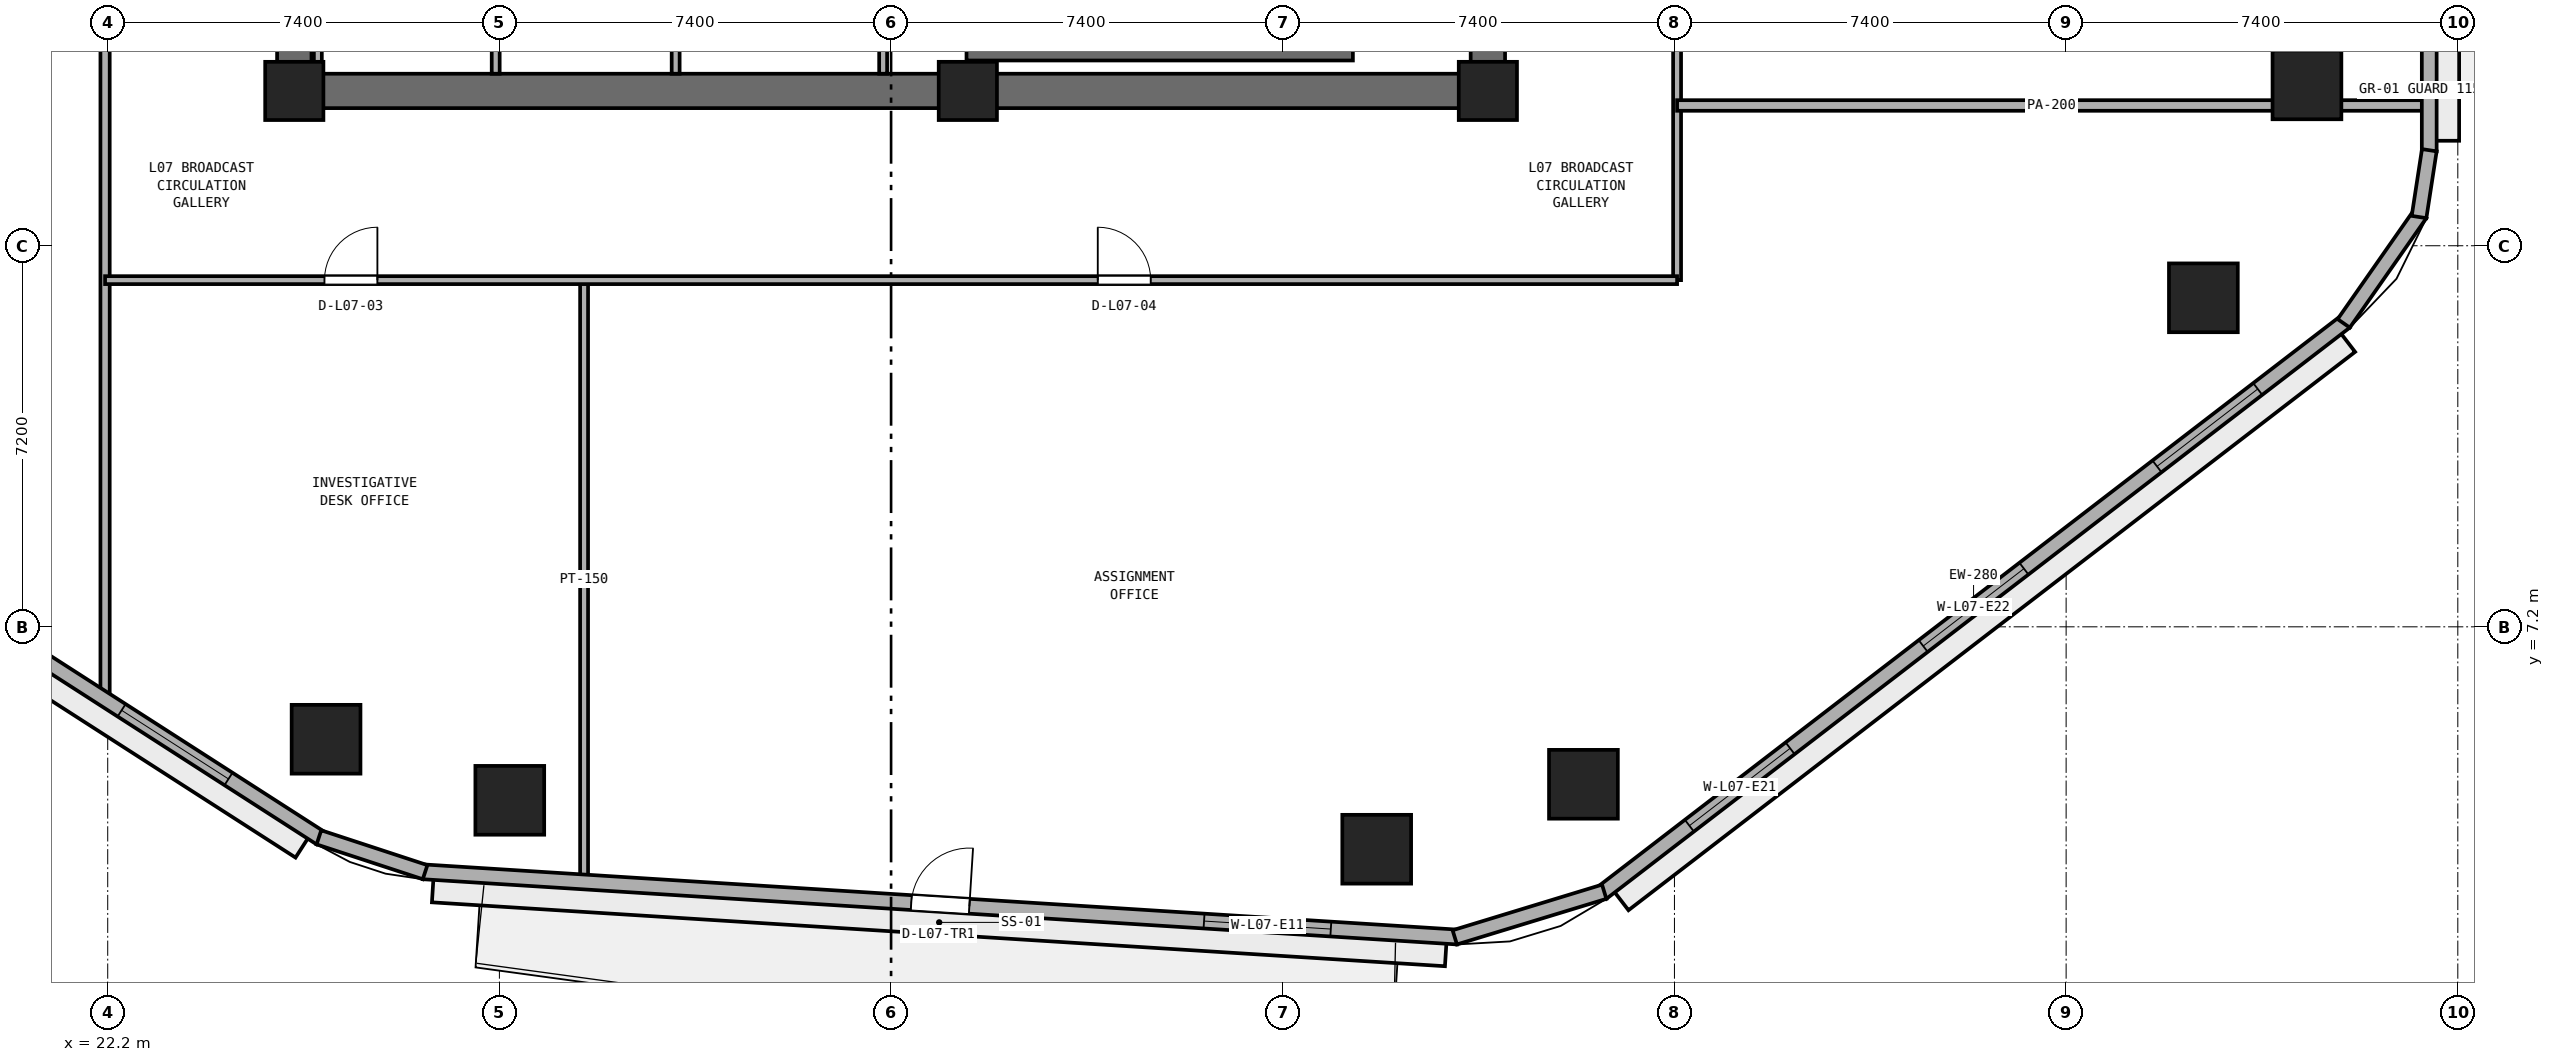
"""IFC4 building model, lengths in metres.
Left out: names, types, materials, properties, quantities, classifications, styles, units other than length and angle.
Written with IfcOpenShell. Run it as: python <this file> out.ifc"""

import sys

from ifc_helpers import new_model, si_unit, direction, frame, frame_2d, origin, origin_2d, place, context, subcontext, project, spatial, rectangle, extrude, element, fill, save


model = new_model("IFC4")
c1 = context("Model", 3, precision=1e-05, world=origin(), true_north=direction((0.0, 1.0)))
c2 = subcontext(c1, "Body", "Model", "MODEL_VIEW")
j1 = project(units=[si_unit("LENGTHUNIT", "METRE"), si_unit("PLANEANGLEUNIT", "RADIAN")], contexts=[c1])
p1 = place(None, origin())
s1 = spatial("IfcSite", under=j1, at=p1, CompositionType="ELEMENT")
p2 = place(p1, origin())
s2 = spatial("IfcBuilding", under=s1, at=p2, CompositionType="ELEMENT")
p3 = place(p2, frame((0.0, 0.0, 32.6)))
s3 = spatial("IfcBuildingStorey", under=s2, at=p3, CompositionType="ELEMENT", Elevation=32.6)
p4 = place(p3, frame((25.4, 17.325, 0.0), z_axis=(0.0, 0.0, 1.0), x_axis=(1.0, 0.0, 0.0)))
e1 = element("IfcWall", 1, at=p4, inside=s3, PredefinedType="SHEAR", context=c2, shape_type="SweptSolid", body=[
    extrude(rectangle(XDim=23.2, YDim=0.65, at=frame_2d((11.6, 0.0))), origin(), (0.0, 0.0, 1.0), 3.525),
])
p5 = place(p3, frame((25.725, 17.65, 0.0), z_axis=(0.0, 0.0, 1.0), x_axis=(0.0, 1.0, 0.0)))
e2 = element("IfcWall", 2, at=p5, inside=s3, PredefinedType="SHEAR", context=c2, shape_type="SweptSolid", body=[
    extrude(rectangle(XDim=15.1, YDim=0.65, at=frame_2d((7.55, 0.0))), origin(), (0.0, 0.0, 1.0), 3.525),
])
p6 = place(p5, frame((6.8, 0.0, 0.0)))
e3 = element("IfcOpeningElement", 3, at=p6, cuts=e2, PredefinedType="OPENING", context=c2, shape_type="SweptSolid", body=[
    extrude(rectangle(XDim=1.5, YDim=2.15, at=frame_2d((0.75, 1.075))), frame((0.0, 0.335, 0.0), z_axis=(0.0, -1.0, 0.0), x_axis=(1.0, 0.0, 0.0)), (0.0, 0.0, 1.0), 0.67),
])
p7 = place(p3, frame((48.275, 17.65, 0.0), z_axis=(0.0, 0.0, 1.0), x_axis=(0.0, 1.0, 0.0)))
e4 = element("IfcWall", 4, at=p7, inside=s3, PredefinedType="SHEAR", context=c2, shape_type="SweptSolid", body=[
    extrude(rectangle(XDim=15.1, YDim=0.65, at=frame_2d((7.55, 0.0))), origin(), (0.0, 0.0, 1.0), 3.525),
])
p8 = place(p7, frame((5.65, 0.0, 0.0)))
e5 = element("IfcOpeningElement", 5, at=p8, cuts=e4, PredefinedType="OPENING", context=c2, shape_type="SweptSolid", body=[
    extrude(rectangle(XDim=1.5, YDim=2.15, at=frame_2d((0.75, 1.075))), frame((0.0, 0.335, 0.0), z_axis=(0.0, -1.0, 0.0), x_axis=(1.0, 0.0, 0.0)), (0.0, 0.0, 1.0), 0.67),
])
for number, where, z_axis, x_axis in (
    (6, (25.725, 17.325, 0.0), (0.0, 0.0, 1.0), (1.0, 0.0, 0.0)),
    (7, (38.45, 17.325, 0.0), (0.0, 0.0, 1.0), (1.0, 0.0, 0.0)),
    (8, (48.275, 17.325, 0.0), (0.0, 0.0, 1.0), (1.0, 0.0, 0.0)),
):
    element("IfcColumn", number, at=place(p3, frame(where, z_axis=z_axis, x_axis=x_axis)), inside=s3, PredefinedType="PILASTER", context=c2, shape_type="SweptSolid", body=[
        extrude(rectangle(XDim=1.1, YDim=1.1, at=origin_2d()), origin(), (0.0, 0.0, 1.0), 3.8),
    ])
for number, where, z_axis, x_axis in (
    (9, (29.796, 3.922, 0.0), (0.0, 0.0, 1.0), (1.0, 0.0, 0.0)),
    (10, (46.175, 2.998, 0.0), (0.0, 0.0, 1.0), (1.0, 0.0, 0.0)),
    (11, (50.081, 4.225, 0.0), (0.0, 0.0, 1.0), (1.0, 0.0, 0.0)),
    (12, (61.793, 13.416, 0.0), (0.0, 0.0, 1.0), (1.0, 0.0, 0.0)),
    (13, (63.75, 17.44, 0.0), (0.0, 0.0, 1.0), (1.0, 0.0, 0.0)),
    (14, (26.325, 5.076, 0.0), (0.0, 0.0, 1.0), (1.0, 0.0, 0.0)),
):
    element("IfcColumn", number, at=place(p3, frame(where, z_axis=z_axis, x_axis=x_axis)), inside=s3, PredefinedType="COLUMN", context=c2, shape_type="SweptSolid", body=[
        extrude(rectangle(XDim=1.3, YDim=1.3, at=origin_2d()), origin(), (0.0, 0.0, 1.0), 3.8),
    ])
p9 = place(p3, frame((38.425, 18.025, 0.0), z_axis=(0.0, 0.0, 1.0), x_axis=(1.0, 0.0, 0.0)))
e15 = element("IfcWall", 15, at=p9, inside=s3, PredefinedType="SHEAR", context=c2, shape_type="SweptSolid", body=[
    extrude(rectangle(XDim=7.3, YDim=0.25, at=frame_2d((3.65, 0.0))), origin(), (0.0, 0.0, 1.0), 3.525),
])
for number, where, z_axis, x_axis in (
    (16, (26.17, 17.65, 0.0), (0.0, 0.0, 1.0), (0.0, 1.0, 0.0)),
    (17, (29.53, 17.65, 0.0), (0.0, 0.0, 1.0), (0.0, 1.0, 0.0)),
    (18, (32.93, 17.65, 0.0), (0.0, 0.0, 1.0), (0.0, 1.0, 0.0)),
    (19, (36.85, 17.65, 0.0), (0.0, 0.0, 1.0), (0.0, 1.0, 0.0)),
):
    element("IfcWall", number, at=place(p3, frame(where, z_axis=z_axis, x_axis=x_axis)), inside=s3, PredefinedType="PARTITIONING", context=c2, shape_type="SweptSolid", body=[
        extrude(rectangle(XDim=2.1, YDim=0.15, at=frame_2d((1.05, 0.0))), origin(), (0.0, 0.0, 1.0), 3.525),
    ])
p10 = place(p3, frame((51.85, 13.75, 0.0), z_axis=(0.0, 0.0, 1.0), x_axis=(0.0, 1.0, 0.0)))
e20 = element("IfcWall", 20, at=p10, inside=s3, PredefinedType="PARTITIONING", context=c2, shape_type="SweptSolid", body=[
    extrude(rectangle(XDim=33.644, YDim=0.15, at=frame_2d((16.822, 0.0))), origin(), (0.0, 0.0, 1.0), 3.525),
])
p11 = place(p10, frame((5.425, 0.0, 0.0)))
e21 = element("IfcOpeningElement", 21, at=p11, cuts=e20, PredefinedType="OPENING", context=c2, shape_type="SweptSolid", body=[
    extrude(rectangle(XDim=0.9, YDim=2.1, at=frame_2d((0.45, 1.05))), frame((0.0, 0.085, 0.0), z_axis=(0.0, -1.0, 0.0), x_axis=(1.0, 0.0, 0.0)), (0.0, 0.0, 1.0), 0.17),
])
p12 = place(p10, frame((15.225, 0.0, 0.0)))
e22 = element("IfcOpeningElement", 22, at=p12, cuts=e20, PredefinedType="OPENING", context=c2, shape_type="SweptSolid", body=[
    extrude(rectangle(XDim=0.9, YDim=2.1, at=frame_2d((0.45, 1.05))), frame((0.0, 0.085, 0.0), z_axis=(0.0, -1.0, 0.0), x_axis=(1.0, 0.0, 0.0)), (0.0, 0.0, 1.0), 0.17),
])
p13 = place(p3, frame((31.2, 2.444, 0.0), z_axis=(0.0, 0.0, 1.0), x_axis=(0.0, 1.0, 0.0)))
e23 = element("IfcWall", 23, at=p13, inside=s3, PredefinedType="PARTITIONING", context=c2, shape_type="SweptSolid", body=[
    extrude(rectangle(XDim=11.306, YDim=0.15, at=frame_2d((5.653, 0.0))), origin(), (0.0, 0.0, 1.0), 3.525),
])
p14 = place(p3, frame((22.15, 5.798, 0.0), z_axis=(0.0, 0.0, 1.0), x_axis=(0.0, 1.0, 0.0)))
e24 = element("IfcWall", 24, at=p14, inside=s3, PredefinedType="PARTITIONING", context=c2, shape_type="SweptSolid", body=[
    extrude(rectangle(XDim=30.852, YDim=0.175, at=frame_2d((15.426, 0.0))), origin(), (0.0, 0.0, 1.0), 3.525),
])
p15 = place(p14, frame((17.302, 0.0, 0.0)))
e25 = element("IfcOpeningElement", 25, at=p15, cuts=e24, PredefinedType="OPENING", context=c2, shape_type="SweptSolid", body=[
    extrude(rectangle(XDim=0.9, YDim=2.1, at=frame_2d((0.45, 1.05))), frame((0.0, 0.097, 0.0), z_axis=(0.0, -1.0, 0.0), x_axis=(1.0, 0.0, 0.0)), (0.0, 0.0, 1.0), 0.195),
])
p16 = place(p3, frame((22.15, 13.75, 0.0), z_axis=(0.0, 0.0, 1.0), x_axis=(1.0, 0.0, 0.0)))
e26 = element("IfcWall", 26, at=p16, inside=s3, PredefinedType="PARTITIONING", context=c2, shape_type="SweptSolid", body=[
    extrude(rectangle(XDim=29.7, YDim=0.15, at=frame_2d((14.85, 0.0))), origin(), (0.0, 0.0, 1.0), 3.525),
])
p17 = place(p16, frame((4.145, 0.0, 0.0)))
e27 = element("IfcOpeningElement", 27, at=p17, cuts=e26, PredefinedType="OPENING", context=c2, shape_type="SweptSolid", body=[
    extrude(rectangle(XDim=1.0, YDim=2.12, at=frame_2d((0.5, 1.06))), frame((0.0, 0.085, 0.0), z_axis=(0.0, -1.0, 0.0), x_axis=(1.0, 0.0, 0.0)), (0.0, 0.0, 1.0), 0.17),
])
p18 = place(p16, frame((18.755, 0.0, 0.0)))
e28 = element("IfcOpeningElement", 28, at=p18, cuts=e26, PredefinedType="OPENING", context=c2, shape_type="SweptSolid", body=[
    extrude(rectangle(XDim=1.0, YDim=2.12, at=frame_2d((0.5, 1.06))), frame((0.0, 0.085, 0.0), z_axis=(0.0, -1.0, 0.0), x_axis=(1.0, 0.0, 0.0)), (0.0, 0.0, 1.0), 0.17),
])
p19 = place(p3, frame((51.85, 17.05, 0.0), z_axis=(0.0, 0.0, 1.0), x_axis=(1.0, 0.0, 0.0)))
e29 = element("IfcWall", 29, at=p19, inside=s3, PredefinedType="PARTITIONING", context=c2, shape_type="SweptSolid", body=[
    extrude(rectangle(XDim=14.145, YDim=0.2, at=frame_2d((7.073, 0.0))), origin(), (0.0, 0.0, 1.0), 3.525),
])
p20 = place(p3, frame((28.161, 2.571, 0.0), z_axis=(0.0, 0.0, 1.0), x_axis=(0.998017288298, -0.06294038654, 0.0)))
e30 = element("IfcWall", 30, at=p20, inside=s3, PredefinedType="STANDARD", context=c2, shape_type="SweptSolid", body=[
    extrude(rectangle(XDim=19.577, YDim=0.28, at=frame_2d((9.789, 0.0))), origin(), (0.0, 0.0, 1.0), 3.525),
])
p21 = place(p20, frame((9.239, 0.0, 0.0)))
e31 = element("IfcOpeningElement", 31, at=p21, cuts=e30, PredefinedType="OPENING", context=c2, shape_type="SweptSolid", body=[
    extrude(rectangle(XDim=1.1, YDim=2.2, at=frame_2d((0.55, 1.1))), frame((0.0, 0.15, 0.0), z_axis=(0.0, -1.0, 0.0), x_axis=(1.0, 0.0, 0.0)), (0.0, 0.0, 1.0), 0.3),
])
p22 = place(p20, frame((14.781, 0.0, 0.9)))
e32 = element("IfcOpeningElement", 32, at=p22, cuts=e30, PredefinedType="OPENING", context=c2, shape_type="SweptSolid", body=[
    extrude(rectangle(XDim=2.4, YDim=1.75, at=frame_2d((1.2, 0.875))), frame((0.0, 0.15, 0.0), z_axis=(0.0, -1.0, 0.0), x_axis=(1.0, 0.0, 0.0)), (0.0, 0.0, 1.0), 0.3),
])
p23 = place(p3, frame((50.429, 2.172, 0.0), z_axis=(0.0, 0.0, 1.0), x_axis=(0.792937466367, 0.609303023488, 0.0)))
e33 = element("IfcWall", 33, at=p23, inside=s3, PredefinedType="STANDARD", context=c2, shape_type="SweptSolid", body=[
    extrude(rectangle(XDim=17.713, YDim=0.28, at=frame_2d((8.856, 0.0))), origin(), (0.0, 0.0, 1.0), 3.525),
])
p24 = place(p23, frame((2.085, 0.0, 0.9)))
e34 = element("IfcOpeningElement", 34, at=p24, cuts=e33, PredefinedType="OPENING", context=c2, shape_type="SweptSolid", body=[
    extrude(rectangle(XDim=2.4, YDim=1.75, at=frame_2d((1.2, 0.875))), frame((0.0, 0.15, 0.0), z_axis=(0.0, -1.0, 0.0), x_axis=(1.0, 0.0, 0.0)), (0.0, 0.0, 1.0), 0.3),
])
p25 = place(p23, frame((7.656, 0.0, 0.9)))
e35 = element("IfcOpeningElement", 35, at=p25, cuts=e33, PredefinedType="OPENING", context=c2, shape_type="SweptSolid", body=[
    extrude(rectangle(XDim=2.4, YDim=1.75, at=frame_2d((1.2, 0.875))), frame((0.0, 0.15, 0.0), z_axis=(0.0, -1.0, 0.0), x_axis=(1.0, 0.0, 0.0)), (0.0, 0.0, 1.0), 0.3),
])
p26 = place(p23, frame((13.227, 0.0, 0.9)))
e36 = element("IfcOpeningElement", 36, at=p26, cuts=e33, PredefinedType="OPENING", context=c2, shape_type="SweptSolid", body=[
    extrude(rectangle(XDim=2.4, YDim=1.75, at=frame_2d((1.2, 0.875))), frame((0.0, 0.15, 0.0), z_axis=(0.0, -1.0, 0.0), x_axis=(1.0, 0.0, 0.0)), (0.0, 0.0, 1.0), 0.3),
])
p27 = place(p3, frame((66.06, 16.183, 0.0), z_axis=(0.0, 0.0, 1.0), x_axis=(0.0, 1.0, 0.0)))
e37 = element("IfcWall", 37, at=p27, inside=s3, PredefinedType="STANDARD", context=c2, shape_type="SweptSolid", body=[
    extrude(rectangle(XDim=19.331, YDim=0.28, at=frame_2d((9.666, 0.0))), origin(), (0.0, 0.0, 1.0), 3.525),
])
p28 = place(p27, frame((9.115, 0.0, 0.0)))
e38 = element("IfcOpeningElement", 38, at=p28, cuts=e37, PredefinedType="OPENING", context=c2, shape_type="SweptSolid", body=[
    extrude(rectangle(XDim=1.1, YDim=2.2, at=frame_2d((0.55, 1.1))), frame((0.0, 0.15, 0.0), z_axis=(0.0, -1.0, 0.0), x_axis=(1.0, 0.0, 0.0)), (0.0, 0.0, 1.0), 0.3),
])
p29 = place(p27, frame((2.355, 0.0, 0.9)))
e39 = element("IfcOpeningElement", 39, at=p29, cuts=e37, PredefinedType="OPENING", context=c2, shape_type="SweptSolid", body=[
    extrude(rectangle(XDim=2.4, YDim=1.75, at=frame_2d((1.2, 0.875))), frame((0.0, 0.15, 0.0), z_axis=(0.0, -1.0, 0.0), x_axis=(1.0, 0.0, 0.0)), (0.0, 0.0, 1.0), 0.3),
])
p30 = place(p27, frame((14.576, 0.0, 0.9)))
e40 = element("IfcOpeningElement", 40, at=p30, cuts=e37, PredefinedType="OPENING", context=c2, shape_type="SweptSolid", body=[
    extrude(rectangle(XDim=2.4, YDim=1.75, at=frame_2d((1.2, 0.875))), frame((0.0, 0.15, 0.0), z_axis=(0.0, -1.0, 0.0), x_axis=(1.0, 0.0, 0.0)), (0.0, 0.0, 1.0), 0.3),
])
p31 = place(p3, frame((11.405, 12.728, 0.0), z_axis=(0.0, 0.0, 1.0), x_axis=(0.841304564637, -0.540561402175, 0.0)))
e41 = element("IfcWall", 41, at=p31, inside=s3, PredefinedType="STANDARD", context=c2, shape_type="SweptSolid", body=[
    extrude(rectangle(XDim=17.612, YDim=0.28, at=frame_2d((8.806, 0.0))), origin(), (0.0, 0.0, 1.0), 3.525),
])
p32 = place(p31, frame((2.069, 0.0, 0.9)))
e42 = element("IfcOpeningElement", 42, at=p32, cuts=e41, PredefinedType="OPENING", context=c2, shape_type="SweptSolid", body=[
    extrude(rectangle(XDim=2.4, YDim=1.75, at=frame_2d((1.2, 0.875))), frame((0.0, 0.15, 0.0), z_axis=(0.0, -1.0, 0.0), x_axis=(1.0, 0.0, 0.0)), (0.0, 0.0, 1.0), 0.3),
])
p33 = place(p31, frame((7.606, 0.0, 0.9)))
e43 = element("IfcOpeningElement", 43, at=p33, cuts=e41, PredefinedType="OPENING", context=c2, shape_type="SweptSolid", body=[
    extrude(rectangle(XDim=2.4, YDim=1.75, at=frame_2d((1.2, 0.875))), frame((0.0, 0.15, 0.0), z_axis=(0.0, -1.0, 0.0), x_axis=(1.0, 0.0, 0.0)), (0.0, 0.0, 1.0), 0.3),
])
p34 = place(p31, frame((13.143, 0.0, 0.9)))
e44 = element("IfcOpeningElement", 44, at=p34, cuts=e41, PredefinedType="OPENING", context=c2, shape_type="SweptSolid", body=[
    extrude(rectangle(XDim=2.4, YDim=1.75, at=frame_2d((1.2, 0.875))), frame((0.0, 0.15, 0.0), z_axis=(0.0, -1.0, 0.0), x_axis=(1.0, 0.0, 0.0)), (0.0, 0.0, 1.0), 0.3),
])
p35 = place(p3, frame((47.65, 1.333, 0.0), z_axis=(0.0, 0.0, 1.0), x_axis=(0.956461287977, 0.291859220516, 0.0)))
e45 = element("IfcWall", 45, at=p35, inside=s3, PredefinedType="STANDARD", context=c2, shape_type="SweptSolid", body=[
    extrude(rectangle(XDim=2.952, YDim=0.28, at=frame_2d((1.476, 0.0))), origin(), (0.0, 0.0, 1.0), 3.525),
])
p36 = place(p3, frame((64.444, 12.933, 0.0), z_axis=(0.0, 0.0, 1.0), x_axis=(0.573176686443, 0.819431806875, 0.0)))
e46 = element("IfcWall", 46, at=p36, inside=s3, PredefinedType="STANDARD", context=c2, shape_type="SweptSolid", body=[
    extrude(rectangle(XDim=2.524, YDim=0.28, at=frame_2d((1.262, 0.0))), origin(), (0.0, 0.0, 1.0), 3.525),
])
p37 = place(p3, frame((65.867, 14.943, 0.0), z_axis=(0.0, 0.0, 1.0), x_axis=(0.152014078361, 0.988378328364, 0.0)))
e47 = element("IfcWall", 47, at=p37, inside=s3, PredefinedType="STANDARD", context=c2, shape_type="SweptSolid", body=[
    extrude(rectangle(XDim=1.277, YDim=0.28, at=frame_2d((0.638, 0.0))), origin(), (0.0, 0.0, 1.0), 3.525),
])
p38 = place(p3, frame((26.19, 3.223, 0.0), z_axis=(0.0, 0.0, 1.0), x_axis=(0.95016442175, -0.311749212734, 0.0)))
e48 = element("IfcWall", 48, at=p38, inside=s3, PredefinedType="STANDARD", context=c2, shape_type="SweptSolid", body=[
    extrude(rectangle(XDim=2.111, YDim=0.28, at=frame_2d((1.056, 0.0))), origin(), (0.0, 0.0, 1.0), 3.525),
])
p39 = place(p17, origin())
e49 = element("IfcDoor", 49, at=p39, inside=s3, OperationType="SINGLE_SWING_RIGHT", PredefinedType="DOOR", context=c2, shape_type="SweptSolid", body=[
    extrude(rectangle(XDim=1.0, YDim=2.12, at=frame_2d((0.5, 1.06))), frame((0.0, 0.025, 0.0), z_axis=(0.0, -1.0, 0.0), x_axis=(1.0, 0.0, 0.0)), (0.0, 0.0, 1.0), 0.05),
])
fill(e27, e49)
p40 = place(p18, origin())
e50 = element("IfcDoor", 50, at=p40, inside=s3, OperationType="SINGLE_SWING_LEFT", PredefinedType="DOOR", context=c2, shape_type="SweptSolid", body=[
    extrude(rectangle(XDim=1.0, YDim=2.12, at=frame_2d((0.5, 1.06))), frame((0.0, 0.025, 0.0), z_axis=(0.0, -1.0, 0.0), x_axis=(1.0, 0.0, 0.0)), (0.0, 0.0, 1.0), 0.05),
])
fill(e28, e50)
p41 = place(p21, origin())
e51 = element("IfcDoor", 51, at=p41, inside=s3, OperationType="SINGLE_SWING_RIGHT", PredefinedType="DOOR", context=c2, shape_type="SweptSolid", body=[
    extrude(rectangle(XDim=1.1, YDim=2.2, at=frame_2d((0.55, 1.1))), frame((0.0, 0.025, 0.0), z_axis=(0.0, -1.0, 0.0), x_axis=(1.0, 0.0, 0.0)), (0.0, 0.0, 1.0), 0.05),
])
fill(e31, e51)
p42 = place(p22, origin())
e52 = element("IfcWindow", 52, at=p42, inside=s3, PartitioningType="SINGLE_PANEL", PredefinedType="WINDOW", context=c2, shape_type="SweptSolid", body=[
    extrude(rectangle(XDim=2.4, YDim=1.75, at=frame_2d((1.2, 0.875))), frame((0.0, 0.03, 0.0), z_axis=(0.0, -1.0, 0.0), x_axis=(1.0, 0.0, 0.0)), (0.0, 0.0, 1.0), 0.06),
])
fill(e32, e52)
p43 = place(p24, origin())
e53 = element("IfcWindow", 53, at=p43, inside=s3, PartitioningType="SINGLE_PANEL", PredefinedType="WINDOW", context=c2, shape_type="SweptSolid", body=[
    extrude(rectangle(XDim=2.4, YDim=1.75, at=frame_2d((1.2, 0.875))), frame((0.0, 0.03, 0.0), z_axis=(0.0, -1.0, 0.0), x_axis=(1.0, 0.0, 0.0)), (0.0, 0.0, 1.0), 0.06),
])
fill(e34, e53)
p44 = place(p25, origin())
e54 = element("IfcWindow", 54, at=p44, inside=s3, PartitioningType="SINGLE_PANEL", PredefinedType="WINDOW", context=c2, shape_type="SweptSolid", body=[
    extrude(rectangle(XDim=2.4, YDim=1.75, at=frame_2d((1.2, 0.875))), frame((0.0, 0.03, 0.0), z_axis=(0.0, -1.0, 0.0), x_axis=(1.0, 0.0, 0.0)), (0.0, 0.0, 1.0), 0.06),
])
fill(e35, e54)
p45 = place(p26, origin())
e55 = element("IfcWindow", 55, at=p45, inside=s3, PartitioningType="SINGLE_PANEL", PredefinedType="WINDOW", context=c2, shape_type="SweptSolid", body=[
    extrude(rectangle(XDim=2.4, YDim=1.75, at=frame_2d((1.2, 0.875))), frame((0.0, 0.03, 0.0), z_axis=(0.0, -1.0, 0.0), x_axis=(1.0, 0.0, 0.0)), (0.0, 0.0, 1.0), 0.06),
])
fill(e36, e55)
p46 = place(p34, origin())
e56 = element("IfcWindow", 56, at=p46, inside=s3, PartitioningType="SINGLE_PANEL", PredefinedType="WINDOW", context=c2, shape_type="SweptSolid", body=[
    extrude(rectangle(XDim=2.4, YDim=1.75, at=frame_2d((1.2, 0.875))), frame((0.0, 0.03, 0.0), z_axis=(0.0, -1.0, 0.0), x_axis=(1.0, 0.0, 0.0)), (0.0, 0.0, 1.0), 0.06),
])
fill(e44, e56)
save(model, sys.argv[1])
